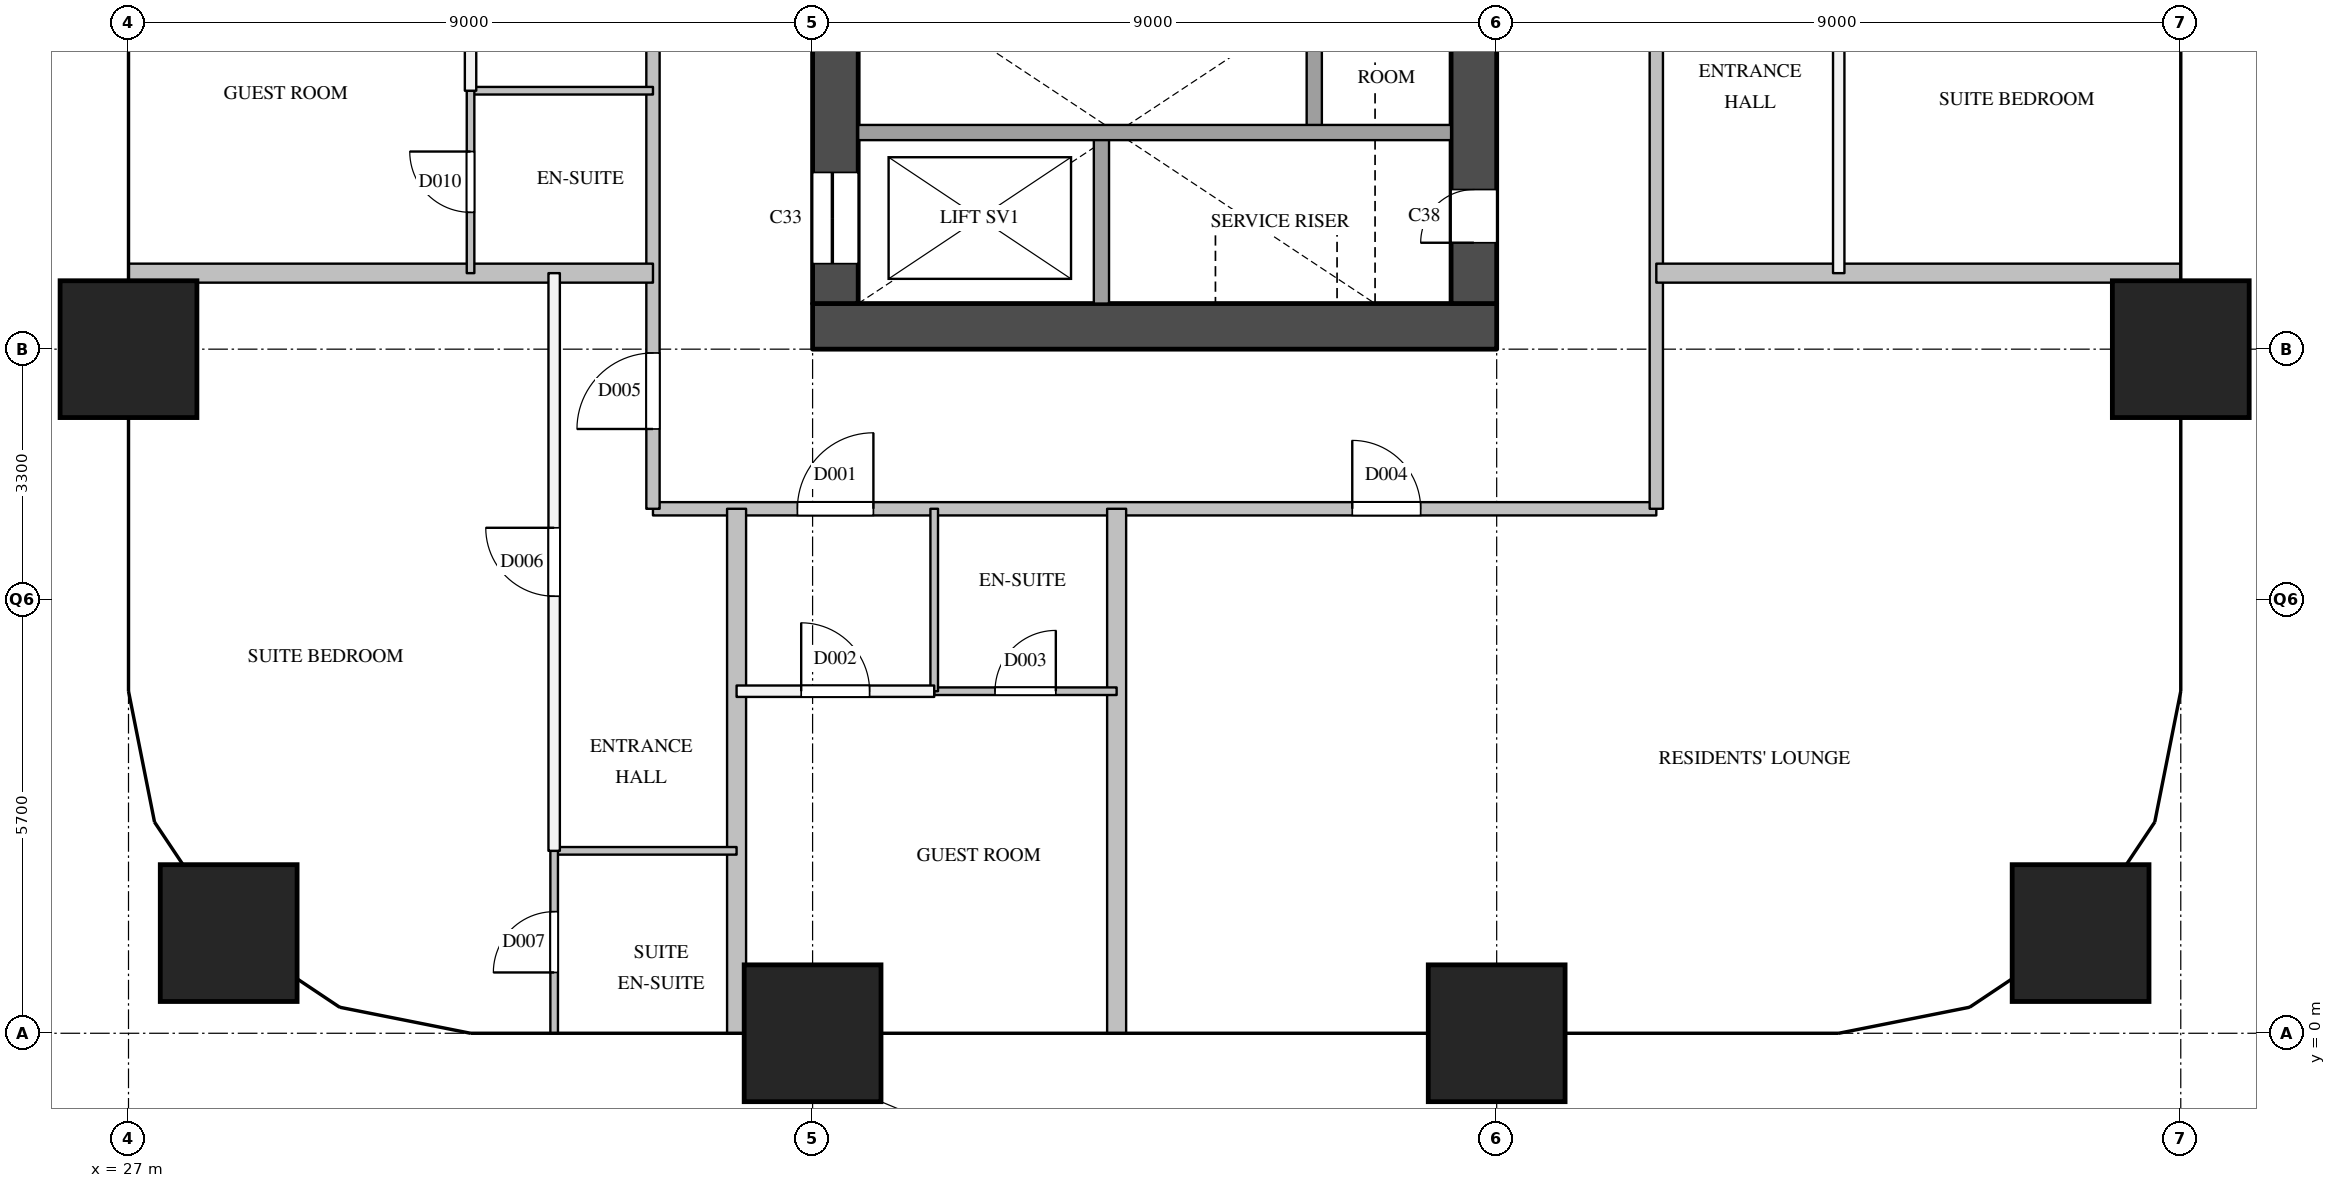
"""IFC4 building model, lengths in metres.
Left out: names, types, materials, properties, quantities, classifications, styles, units other than length and angle.
Written with IfcOpenShell. Run it as: python <this file> out.ifc"""

import sys

from ifc_helpers import new_model, si_unit, direction, frame, frame_2d, origin, origin_2d, place, context, subcontext, project, spatial, rectangle, extrude, element, fill, save


model = new_model("IFC4")
c1 = context("Model", 3, precision=1e-05, world=origin(), true_north=direction((0.0, 1.0)))
c2 = subcontext(c1, "Body", "Model", "MODEL_VIEW")
j1 = project(units=[si_unit("LENGTHUNIT", "METRE"), si_unit("PLANEANGLEUNIT", "RADIAN")], contexts=[c1])
p1 = place(None, origin())
s1 = spatial("IfcSite", under=j1, at=p1, CompositionType="ELEMENT")
p2 = place(p1, origin())
s2 = spatial("IfcBuilding", under=s1, at=p2, CompositionType="ELEMENT")
p3 = place(p2, frame((0.0, 0.0, 85.4)))
s3 = spatial("IfcBuildingStorey", under=s2, at=p3, CompositionType="ELEMENT", Elevation=85.4)
for number, where, z_axis, x_axis in (
    (1, (28.318, 1.318, 0.0), (0.0, 0.0, 1.0), (1.0, 0.0, 0.0)),
    (2, (27.0, 9.0, 0.0), (0.0, 0.0, 1.0), (1.0, 0.0, 0.0)),
    (3, (36.0, 0.0, 0.0), (0.0, 0.0, 1.0), (1.0, 0.0, 0.0)),
    (4, (45.0, 0.0, 0.0), (0.0, 0.0, 1.0), (1.0, 0.0, 0.0)),
    (5, (52.682, 1.318, 0.0), (0.0, 0.0, 1.0), (1.0, 0.0, 0.0)),
    (6, (54.0, 9.0, 0.0), (0.0, 0.0, 1.0), (1.0, 0.0, 0.0)),
):
    element("IfcColumn", number, at=place(p3, frame(where, z_axis=z_axis, x_axis=x_axis)), inside=s3, PredefinedType="COLUMN", context=c2, shape_type="SweptSolid", body=[
        extrude(rectangle(XDim=1.8, YDim=1.8, at=origin_2d()), origin(), (0.0, 0.0, 1.0), 3.8),
    ])
p4 = place(p3, frame((36.0, 9.3, 0.0), z_axis=(0.0, 0.0, 1.0), x_axis=(1.0, 0.0, 0.0)))
e7 = element("IfcWall", 7, at=p4, inside=s3, PredefinedType="SHEAR", context=c2, shape_type="SweptSolid", body=[
    extrude(rectangle(XDim=9.0, YDim=0.6, at=frame_2d((4.5, 0.0))), origin(), (0.0, 0.0, 1.0), 3.5),
])
p5 = place(p3, frame((36.3, 9.6, 0.0), z_axis=(0.0, 0.0, 1.0), x_axis=(0.0, 1.0, 0.0)))
e8 = element("IfcWall", 8, at=p5, inside=s3, PredefinedType="SHEAR", context=c2, shape_type="SweptSolid", body=[
    extrude(rectangle(XDim=12.3, YDim=0.6, at=frame_2d((6.15, 0.0))), origin(), (0.0, 0.0, 1.0), 3.5),
])
p6 = place(p5, frame((0.525, 0.0, 0.0)))
e9 = element("IfcOpeningElement", 9, at=p6, cuts=e8, PredefinedType="OPENING", context=c2, shape_type="SweptSolid", body=[
    extrude(rectangle(XDim=1.2, YDim=2.1, at=frame_2d((0.6, 1.05))), frame((0.0, 0.31, 0.0), z_axis=(0.0, -1.0, 0.0), x_axis=(1.0, 0.0, 0.0)), (0.0, 0.0, 1.0), 0.62),
])
p7 = place(p5, frame((4.8, 0.0, 0.0)))
e10 = element("IfcOpeningElement", 10, at=p7, cuts=e8, PredefinedType="OPENING", context=c2, shape_type="SweptSolid", body=[
    extrude(rectangle(XDim=1.0, YDim=2.1, at=frame_2d((0.5, 1.05))), frame((0.0, 0.31, 0.0), z_axis=(0.0, -1.0, 0.0), x_axis=(1.0, 0.0, 0.0)), (0.0, 0.0, 1.0), 0.62),
])
p8 = place(p3, frame((44.7, 9.6, 0.0), z_axis=(0.0, 0.0, 1.0), x_axis=(0.0, 1.0, 0.0)))
e11 = element("IfcWall", 11, at=p8, inside=s3, PredefinedType="SHEAR", context=c2, shape_type="SweptSolid", body=[
    extrude(rectangle(XDim=12.3, YDim=0.6, at=frame_2d((6.15, 0.0))), origin(), (0.0, 0.0, 1.0), 3.5),
])
p9 = place(p8, frame((0.8, 0.0, 0.0)))
e12 = element("IfcOpeningElement", 12, at=p9, cuts=e11, PredefinedType="OPENING", context=c2, shape_type="SweptSolid", body=[
    extrude(rectangle(XDim=0.7, YDim=2.1, at=frame_2d((0.35, 1.05))), frame((0.0, 0.31, 0.0), z_axis=(0.0, -1.0, 0.0), x_axis=(1.0, 0.0, 0.0)), (0.0, 0.0, 1.0), 0.62),
])
p10 = place(p3, frame((39.8, 9.6, 0.0), z_axis=(0.0, 0.0, 1.0), x_axis=(0.0, 1.0, 0.0)))
e13 = element("IfcWall", 13, at=p10, inside=s3, PredefinedType="SOLIDWALL", context=c2, shape_type="SweptSolid", body=[
    extrude(rectangle(XDim=2.3, YDim=0.2, at=frame_2d((1.15, 0.0))), origin(), (0.0, 0.0, 1.0), 3.5),
])
p11 = place(p3, frame((42.6, 11.9, 0.0), z_axis=(0.0, 0.0, 1.0), x_axis=(0.0, 1.0, 0.0)))
e14 = element("IfcWall", 14, at=p11, inside=s3, PredefinedType="SOLIDWALL", context=c2, shape_type="SweptSolid", body=[
    extrude(rectangle(XDim=2.2, YDim=0.2, at=frame_2d((1.1, 0.0))), origin(), (0.0, 0.0, 1.0), 3.5),
])
p12 = place(p3, frame((36.6, 11.85, 0.0), z_axis=(0.0, 0.0, 1.0), x_axis=(1.0, 0.0, 0.0)))
e15 = element("IfcWall", 15, at=p12, inside=s3, PredefinedType="SOLIDWALL", context=c2, shape_type="SweptSolid", body=[
    extrude(rectangle(XDim=7.8, YDim=0.2, at=frame_2d((3.9, 0.0))), origin(), (0.0, 0.0, 1.0), 3.5),
])
p13 = place(p3, frame((33.9, 6.9, 0.0), z_axis=(0.0, 0.0, 1.0), x_axis=(1.0, 0.0, 0.0)))
e16 = element("IfcWall", 16, at=p13, inside=s3, PredefinedType="PARTITIONING", context=c2, shape_type="SweptSolid", body=[
    extrude(rectangle(XDim=13.2, YDim=0.175, at=frame_2d((6.6, 0.0))), origin(), (0.0, 0.0, 1.0), 3.5),
])
p14 = place(p13, frame((1.9, 0.0, 0.0)))
e17 = element("IfcOpeningElement", 17, at=p14, cuts=e16, PredefinedType="OPENING", context=c2, shape_type="SweptSolid", body=[
    extrude(rectangle(XDim=1.0, YDim=2.1, at=frame_2d((0.5, 1.05))), frame((0.0, 0.097, 0.0), z_axis=(0.0, -1.0, 0.0), x_axis=(1.0, 0.0, 0.0)), (0.0, 0.0, 1.0), 0.195),
])
p15 = place(p13, frame((9.2, 0.0, 0.0)))
e18 = element("IfcOpeningElement", 18, at=p15, cuts=e16, PredefinedType="OPENING", context=c2, shape_type="SweptSolid", body=[
    extrude(rectangle(XDim=0.9, YDim=2.1, at=frame_2d((0.45, 1.05))), frame((0.0, 0.097, 0.0), z_axis=(0.0, -1.0, 0.0), x_axis=(1.0, 0.0, 0.0)), (0.0, 0.0, 1.0), 0.195),
])
p16 = place(p3, frame((33.9, 6.9, 0.0), z_axis=(0.0, 0.0, 1.0), x_axis=(0.0, 1.0, 0.0)))
e19 = element("IfcWall", 19, at=p16, inside=s3, PredefinedType="PARTITIONING", context=c2, shape_type="SweptSolid", body=[
    extrude(rectangle(XDim=17.69, YDim=0.175, at=frame_2d((8.845, 0.0))), origin(), (0.0, 0.0, 1.0), 3.5),
])
p17 = place(p16, frame((1.05, 0.0, 0.0)))
e20 = element("IfcOpeningElement", 20, at=p17, cuts=e19, PredefinedType="OPENING", context=c2, shape_type="SweptSolid", body=[
    extrude(rectangle(XDim=1.0, YDim=2.1, at=frame_2d((0.5, 1.05))), frame((0.0, 0.097, 0.0), z_axis=(0.0, -1.0, 0.0), x_axis=(1.0, 0.0, 0.0)), (0.0, 0.0, 1.0), 0.195),
])
p18 = place(p16, frame((6.3, 0.0, 0.0)))
e21 = element("IfcOpeningElement", 21, at=p18, cuts=e19, PredefinedType="OPENING", context=c2, shape_type="SweptSolid", body=[
    extrude(rectangle(XDim=1.0, YDim=2.1, at=frame_2d((0.5, 1.05))), frame((0.0, 0.097, 0.0), z_axis=(0.0, -1.0, 0.0), x_axis=(1.0, 0.0, 0.0)), (0.0, 0.0, 1.0), 0.195),
])
p19 = place(p16, frame((13.595, 0.0, 0.0)))
e22 = element("IfcOpeningElement", 22, at=p19, cuts=e19, PredefinedType="OPENING", context=c2, shape_type="SweptSolid", body=[
    extrude(rectangle(XDim=1.0, YDim=2.1, at=frame_2d((0.5, 1.05))), frame((0.0, 0.097, 0.0), z_axis=(0.0, -1.0, 0.0), x_axis=(1.0, 0.0, 0.0)), (0.0, 0.0, 1.0), 0.195),
])
p20 = place(p3, frame((47.1, 6.9, 0.0), z_axis=(0.0, 0.0, 1.0), x_axis=(0.0, 1.0, 0.0)))
e23 = element("IfcWall", 23, at=p20, inside=s3, PredefinedType="PARTITIONING", context=c2, shape_type="SweptSolid", body=[
    extrude(rectangle(XDim=17.09, YDim=0.175, at=frame_2d((8.545, 0.0))), origin(), (0.0, 0.0, 1.0), 3.5),
])
p21 = place(p20, frame((6.4, 0.0, 0.0)))
e24 = element("IfcOpeningElement", 24, at=p21, cuts=e23, PredefinedType="OPENING", context=c2, shape_type="SweptSolid", body=[
    extrude(rectangle(XDim=1.0, YDim=2.1, at=frame_2d((0.5, 1.05))), frame((0.0, 0.097, 0.0), z_axis=(0.0, -1.0, 0.0), x_axis=(1.0, 0.0, 0.0)), (0.0, 0.0, 1.0), 0.195),
])
p22 = place(p20, frame((13.9, 0.0, 0.0)))
e25 = element("IfcOpeningElement", 25, at=p22, cuts=e23, PredefinedType="OPENING", context=c2, shape_type="SweptSolid", body=[
    extrude(rectangle(XDim=1.0, YDim=2.1, at=frame_2d((0.5, 1.05))), frame((0.0, 0.097, 0.0), z_axis=(0.0, -1.0, 0.0), x_axis=(1.0, 0.0, 0.0)), (0.0, 0.0, 1.0), 0.195),
])
p23 = place(p3, frame((35.0, 4.5, 0.0), z_axis=(0.0, 0.0, 1.0), x_axis=(1.0, 0.0, 0.0)))
e26 = element("IfcWall", 26, at=p23, inside=s3, PredefinedType="PARTITIONING", context=c2, shape_type="SweptSolid", body=[
    extrude(rectangle(XDim=2.6, YDim=0.15, at=frame_2d((1.3, 0.0))), origin(), (0.0, 0.0, 1.0), 3.5),
])
p24 = place(p23, frame((0.85, 0.0, 0.0)))
e27 = element("IfcOpeningElement", 27, at=p24, cuts=e26, PredefinedType="OPENING", context=c2, shape_type="SweptSolid", body=[
    extrude(rectangle(XDim=0.9, YDim=2.1, at=frame_2d((0.45, 1.05))), frame((0.0, 0.085, 0.0), z_axis=(0.0, -1.0, 0.0), x_axis=(1.0, 0.0, 0.0)), (0.0, 0.0, 1.0), 0.17),
])
p25 = place(p3, frame((31.5, 12.4, 0.0), z_axis=(0.0, 0.0, 1.0), x_axis=(0.0, 1.0, 0.0)))
e28 = element("IfcWall", 28, at=p25, inside=s3, PredefinedType="PARTITIONING", context=c2, shape_type="SweptSolid", body=[
    extrude(rectangle(XDim=2.6, YDim=0.15, at=frame_2d((1.3, 0.0))), origin(), (0.0, 0.0, 1.0), 3.5),
])
p26 = place(p25, frame((0.85, 0.0, 0.0)))
e29 = element("IfcOpeningElement", 29, at=p26, cuts=e28, PredefinedType="OPENING", context=c2, shape_type="SweptSolid", body=[
    extrude(rectangle(XDim=0.9, YDim=2.1, at=frame_2d((0.45, 1.05))), frame((0.0, 0.085, 0.0), z_axis=(0.0, -1.0, 0.0), x_axis=(1.0, 0.0, 0.0)), (0.0, 0.0, 1.0), 0.17),
])
p27 = place(p3, frame((32.6, 2.4, 0.0), z_axis=(0.0, 0.0, 1.0), x_axis=(0.0, 1.0, 0.0)))
e30 = element("IfcWall", 30, at=p27, inside=s3, PredefinedType="PARTITIONING", context=c2, shape_type="SweptSolid", body=[
    extrude(rectangle(XDim=7.6, YDim=0.15, at=frame_2d((3.8, 0.0))), origin(), (0.0, 0.0, 1.0), 3.5),
])
p28 = place(p27, frame((3.35, 0.0, 0.0)))
e31 = element("IfcOpeningElement", 31, at=p28, cuts=e30, PredefinedType="OPENING", context=c2, shape_type="SweptSolid", body=[
    extrude(rectangle(XDim=0.9, YDim=2.1, at=frame_2d((0.45, 1.05))), frame((0.0, 0.085, 0.0), z_axis=(0.0, -1.0, 0.0), x_axis=(1.0, 0.0, 0.0)), (0.0, 0.0, 1.0), 0.17),
])
p29 = place(p3, frame((49.5, 10.0, 0.0), z_axis=(0.0, 0.0, 1.0), x_axis=(0.0, 1.0, 0.0)))
e32 = element("IfcWall", 32, at=p29, inside=s3, PredefinedType="PARTITIONING", context=c2, shape_type="SweptSolid", body=[
    extrude(rectangle(XDim=7.6, YDim=0.15, at=frame_2d((3.8, 0.0))), origin(), (0.0, 0.0, 1.0), 3.5),
])
p30 = place(p29, frame((3.35, 0.0, 0.0)))
e33 = element("IfcOpeningElement", 33, at=p30, cuts=e32, PredefinedType="OPENING", context=c2, shape_type="SweptSolid", body=[
    extrude(rectangle(XDim=0.9, YDim=2.1, at=frame_2d((0.45, 1.05))), frame((0.0, 0.085, 0.0), z_axis=(0.0, -1.0, 0.0), x_axis=(1.0, 0.0, 0.0)), (0.0, 0.0, 1.0), 0.17),
])
for number, where, z_axis, x_axis in (
    (34, (27.0, 10.0, 0.0), (0.0, 0.0, 1.0), (1.0, 0.0, 0.0)),
    (35, (47.1, 10.0, 0.0), (0.0, 0.0, 1.0), (1.0, 0.0, 0.0)),
    (36, (35.0, 0.0, 0.0), (0.0, 0.0, 1.0), (0.0, 1.0, 0.0)),
    (37, (40.0, 0.0, 0.0), (0.0, 0.0, 1.0), (0.0, 1.0, 0.0)),
):
    element("IfcWall", number, at=place(p3, frame(where, z_axis=z_axis, x_axis=x_axis)), inside=s3, PredefinedType="PARTITIONING", context=c2, shape_type="SweptSolid", body=[
        extrude(rectangle(XDim=6.9, YDim=0.25, at=frame_2d((3.45, 0.0))), origin(), (0.0, 0.0, 1.0), 2.5),
    ])
p31 = place(p3, frame((32.6, 2.4, 0.0), z_axis=(0.0, 0.0, 1.0), x_axis=(1.0, 0.0, 0.0)))
e38 = element("IfcWall", 38, at=p31, inside=s3, PredefinedType="PARTITIONING", context=c2, shape_type="SweptSolid", body=[
    extrude(rectangle(XDim=2.4, YDim=0.1, at=frame_2d((1.2, 0.0))), origin(), (0.0, 0.0, 1.0), 3.5),
])
p32 = place(p3, frame((37.6, 4.5, 0.0), z_axis=(0.0, 0.0, 1.0), x_axis=(1.0, 0.0, 0.0)))
e39 = element("IfcWall", 39, at=p32, inside=s3, PredefinedType="PARTITIONING", context=c2, shape_type="SweptSolid", body=[
    extrude(rectangle(XDim=2.4, YDim=0.1, at=frame_2d((1.2, 0.0))), origin(), (0.0, 0.0, 1.0), 3.5),
])
p33 = place(p32, frame((0.8, 0.0, 0.0)))
e40 = element("IfcOpeningElement", 40, at=p33, cuts=e39, PredefinedType="OPENING", context=c2, shape_type="SweptSolid", body=[
    extrude(rectangle(XDim=0.8, YDim=2.1, at=frame_2d((0.4, 1.05))), frame((0.0, 0.06, 0.0), z_axis=(0.0, -1.0, 0.0), x_axis=(1.0, 0.0, 0.0)), (0.0, 0.0, 1.0), 0.12),
])
p34 = place(p3, frame((31.5, 12.4, 0.0), z_axis=(0.0, 0.0, 1.0), x_axis=(1.0, 0.0, 0.0)))
e41 = element("IfcWall", 41, at=p34, inside=s3, PredefinedType="PARTITIONING", context=c2, shape_type="SweptSolid", body=[
    extrude(rectangle(XDim=2.4, YDim=0.1, at=frame_2d((1.2, 0.0))), origin(), (0.0, 0.0, 1.0), 3.5),
])
p35 = place(p3, frame((31.5, 10.0, 0.0), z_axis=(0.0, 0.0, 1.0), x_axis=(0.0, 1.0, 0.0)))
e42 = element("IfcWall", 42, at=p35, inside=s3, PredefinedType="PARTITIONING", context=c2, shape_type="SweptSolid", body=[
    extrude(rectangle(XDim=2.4, YDim=0.1, at=frame_2d((1.2, 0.0))), origin(), (0.0, 0.0, 1.0), 3.5),
])
p36 = place(p35, frame((0.8, 0.0, 0.0)))
e43 = element("IfcOpeningElement", 43, at=p36, cuts=e42, PredefinedType="OPENING", context=c2, shape_type="SweptSolid", body=[
    extrude(rectangle(XDim=0.8, YDim=2.1, at=frame_2d((0.4, 1.05))), frame((0.0, 0.06, 0.0), z_axis=(0.0, -1.0, 0.0), x_axis=(1.0, 0.0, 0.0)), (0.0, 0.0, 1.0), 0.12),
])
p37 = place(p3, frame((32.6, 0.0, 0.0), z_axis=(0.0, 0.0, 1.0), x_axis=(0.0, 1.0, 0.0)))
e44 = element("IfcWall", 44, at=p37, inside=s3, PredefinedType="PARTITIONING", context=c2, shape_type="SweptSolid", body=[
    extrude(rectangle(XDim=2.4, YDim=0.1, at=frame_2d((1.2, 0.0))), origin(), (0.0, 0.0, 1.0), 2.5),
])
p38 = place(p37, frame((0.8, 0.0, 0.0)))
e45 = element("IfcOpeningElement", 45, at=p38, cuts=e44, PredefinedType="OPENING", context=c2, shape_type="SweptSolid", body=[
    extrude(rectangle(XDim=0.8, YDim=2.1, at=frame_2d((0.4, 1.05))), frame((0.0, 0.06, 0.0), z_axis=(0.0, -1.0, 0.0), x_axis=(1.0, 0.0, 0.0)), (0.0, 0.0, 1.0), 0.12),
])
p39 = place(p3, frame((37.6, 4.5, 0.0), z_axis=(0.0, 0.0, 1.0), x_axis=(0.0, 1.0, 0.0)))
e46 = element("IfcWall", 46, at=p39, inside=s3, PredefinedType="PARTITIONING", context=c2, shape_type="SweptSolid", body=[
    extrude(rectangle(XDim=2.4, YDim=0.1, at=frame_2d((1.2, 0.0))), origin(), (0.0, 0.0, 1.0), 3.5),
])
p40 = place(p6, origin())
e47 = element("IfcDoor", 47, at=p40, inside=s3, OperationType="SLIDING_TO_LEFT", PredefinedType="DOOR", context=c2, shape_type="SweptSolid", body=[
    extrude(rectangle(XDim=1.2, YDim=2.1, at=frame_2d((0.6, 1.05))), frame((0.0, 0.025, 0.0), z_axis=(0.0, -1.0, 0.0), x_axis=(1.0, 0.0, 0.0)), (0.0, 0.0, 1.0), 0.05),
])
fill(e9, e47)
p41 = place(p9, origin())
e48 = element("IfcDoor", 48, at=p41, inside=s3, OperationType="SINGLE_SWING_LEFT", PredefinedType="DOOR", context=c2, shape_type="SweptSolid", body=[
    extrude(rectangle(XDim=0.7, YDim=2.1, at=frame_2d((0.35, 1.05))), frame((0.0, 0.025, 0.0), z_axis=(0.0, -1.0, 0.0), x_axis=(1.0, 0.0, 0.0)), (0.0, 0.0, 1.0), 0.05),
])
fill(e12, e48)
p42 = place(p14, origin())
e49 = element("IfcDoor", 49, at=p42, inside=s3, OperationType="SINGLE_SWING_RIGHT", PredefinedType="DOOR", context=c2, shape_type="SweptSolid", body=[
    extrude(rectangle(XDim=1.0, YDim=2.1, at=frame_2d((0.5, 1.05))), frame((0.0, 0.025, 0.0), z_axis=(0.0, -1.0, 0.0), x_axis=(1.0, 0.0, 0.0)), (0.0, 0.0, 1.0), 0.05),
])
fill(e17, e49)
p43 = place(p24, origin())
e50 = element("IfcDoor", 50, at=p43, inside=s3, OperationType="SINGLE_SWING_LEFT", PredefinedType="DOOR", context=c2, shape_type="SweptSolid", body=[
    extrude(rectangle(XDim=0.9, YDim=2.1, at=frame_2d((0.45, 1.05))), frame((0.0, 0.025, 0.0), z_axis=(0.0, -1.0, 0.0), x_axis=(1.0, 0.0, 0.0)), (0.0, 0.0, 1.0), 0.05),
])
fill(e27, e50)
p44 = place(p33, origin())
e51 = element("IfcDoor", 51, at=p44, inside=s3, OperationType="SINGLE_SWING_RIGHT", PredefinedType="DOOR", context=c2, shape_type="SweptSolid", body=[
    extrude(rectangle(XDim=0.8, YDim=2.1, at=frame_2d((0.4, 1.05))), frame((0.0, 0.025, 0.0), z_axis=(0.0, -1.0, 0.0), x_axis=(1.0, 0.0, 0.0)), (0.0, 0.0, 1.0), 0.05),
])
fill(e40, e51)
p45 = place(p15, origin())
e52 = element("IfcDoor", 52, at=p45, inside=s3, OperationType="SINGLE_SWING_LEFT", PredefinedType="DOOR", context=c2, shape_type="SweptSolid", body=[
    extrude(rectangle(XDim=0.9, YDim=2.1, at=frame_2d((0.45, 1.05))), frame((0.0, 0.025, 0.0), z_axis=(0.0, -1.0, 0.0), x_axis=(1.0, 0.0, 0.0)), (0.0, 0.0, 1.0), 0.05),
])
fill(e18, e52)
p46 = place(p17, origin())
e53 = element("IfcDoor", 53, at=p46, inside=s3, OperationType="SINGLE_SWING_LEFT", PredefinedType="DOOR", context=c2, shape_type="SweptSolid", body=[
    extrude(rectangle(XDim=1.0, YDim=2.1, at=frame_2d((0.5, 1.05))), frame((0.0, 0.025, 0.0), z_axis=(0.0, -1.0, 0.0), x_axis=(1.0, 0.0, 0.0)), (0.0, 0.0, 1.0), 0.05),
])
fill(e20, e53)
p47 = place(p28, origin())
e54 = element("IfcDoor", 54, at=p47, inside=s3, OperationType="SINGLE_SWING_RIGHT", PredefinedType="DOOR", context=c2, shape_type="SweptSolid", body=[
    extrude(rectangle(XDim=0.9, YDim=2.1, at=frame_2d((0.45, 1.05))), frame((0.0, 0.025, 0.0), z_axis=(0.0, -1.0, 0.0), x_axis=(1.0, 0.0, 0.0)), (0.0, 0.0, 1.0), 0.05),
])
fill(e31, e54)
p48 = place(p38, origin())
e55 = element("IfcDoor", 55, at=p48, inside=s3, OperationType="SINGLE_SWING_LEFT", PredefinedType="DOOR", context=c2, shape_type="SweptSolid", body=[
    extrude(rectangle(XDim=0.8, YDim=2.1, at=frame_2d((0.4, 1.05))), frame((0.0, 0.025, 0.0), z_axis=(0.0, -1.0, 0.0), x_axis=(1.0, 0.0, 0.0)), (0.0, 0.0, 1.0), 0.05),
])
fill(e45, e55)
p49 = place(p36, origin())
e56 = element("IfcDoor", 56, at=p49, inside=s3, OperationType="SINGLE_SWING_RIGHT", PredefinedType="DOOR", context=c2, shape_type="SweptSolid", body=[
    extrude(rectangle(XDim=0.8, YDim=2.1, at=frame_2d((0.4, 1.05))), frame((0.0, 0.025, 0.0), z_axis=(0.0, -1.0, 0.0), x_axis=(1.0, 0.0, 0.0)), (0.0, 0.0, 1.0), 0.05),
])
fill(e43, e56)
save(model, sys.argv[1])
